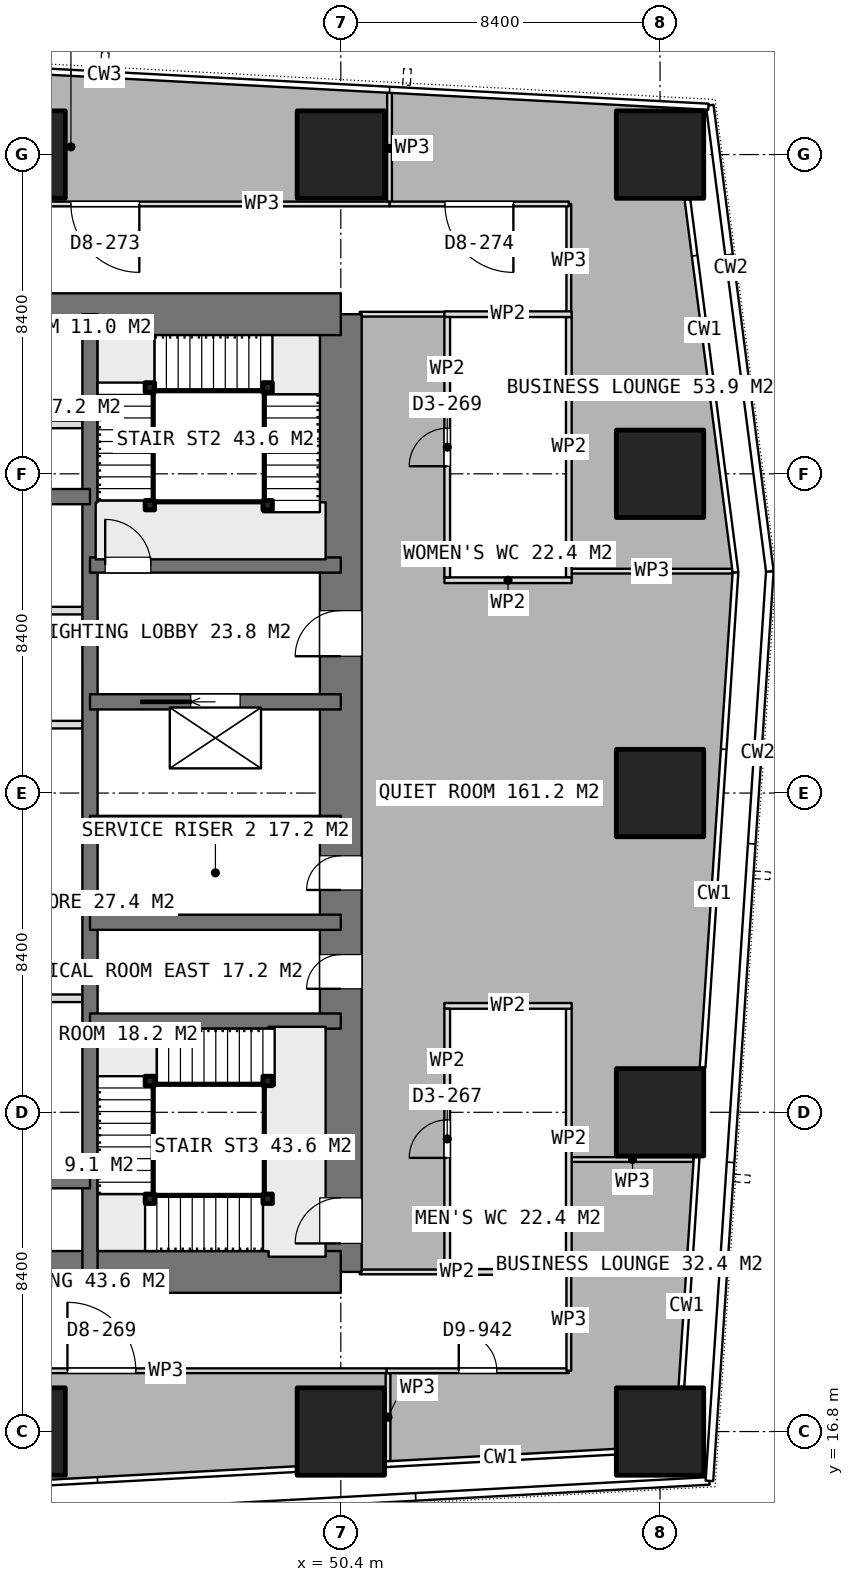
"""IFC4 building model, lengths in metres.
Left out: names, types, materials, properties, quantities, classifications, styles, units other than length and angle.
Written with IfcOpenShell. Run it as: python <this file> out.ifc"""

import sys

from ifc_helpers import new_model, si_unit, direction, frame, frame_2d, origin, origin_2d, place, context, subcontext, project, spatial, rectangle, extrude, element, fill, save


model = new_model("IFC4")
c1 = context("Model", 3, precision=1e-05, world=origin(), true_north=direction((0.0, 1.0)))
c2 = subcontext(c1, "Body", "Model", "MODEL_VIEW")
j1 = project(units=[si_unit("LENGTHUNIT", "METRE"), si_unit("PLANEANGLEUNIT", "RADIAN")], contexts=[c1])
p1 = place(None, origin())
s1 = spatial("IfcSite", under=j1, at=p1, CompositionType="ELEMENT")
p2 = place(p1, origin())
s2 = spatial("IfcBuilding", under=s1, at=p2, CompositionType="ELEMENT")
p3 = place(p2, frame((0.0, 0.0, 250.1)))
s3 = spatial("IfcBuildingStorey", under=s2, at=p3, CompositionType="ELEMENT", Elevation=250.1)
for number, where, z_axis, x_axis in (
    (1, (40.0, 21.0, 0.0), (0.0, 0.0, 1.0), (1.0, 0.0, 0.0)),
    (2, (40.0, 46.2, 0.0), (0.0, 0.0, 1.0), (1.0, 0.0, 0.0)),
):
    element("IfcWall", number, at=place(p3, frame(where, z_axis=z_axis, x_axis=x_axis)), inside=s3, PredefinedType="SHEAR", context=c2, shape_type="SweptSolid", body=[
        extrude(rectangle(XDim=10.4, YDim=1.1, at=frame_2d((5.2, 0.0))), origin(), (0.0, 0.0, 1.0), 3.75),
    ])
p4 = place(p3, frame((50.4, 21.0, 0.0), z_axis=(0.0, 0.0, 1.0), x_axis=(0.0, 1.0, 0.0)))
e3 = element("IfcWall", 3, at=p4, inside=s3, PredefinedType="SHEAR", context=c2, shape_type="SweptSolid", body=[
    extrude(rectangle(XDim=25.2, YDim=1.1, at=frame_2d((12.6, 0.0))), origin(), (0.0, 0.0, 1.0), 3.75),
])
p5 = place(p4, frame((16.2, 0.0, 0.0)))
e4 = element("IfcOpeningElement", 4, at=p5, cuts=e3, PredefinedType="OPENING", context=c2, shape_type="SweptSolid", body=[
    extrude(rectangle(XDim=1.2, YDim=2.1, at=frame_2d((0.6, 1.05))), frame((0.0, 0.56, 0.0), z_axis=(0.0, -1.0, 0.0), x_axis=(1.0, 0.0, 0.0)), (0.0, 0.0, 1.0), 1.12),
])
p6 = place(p4, frame((10.05, 0.0, 0.0)))
e5 = element("IfcOpeningElement", 5, at=p6, cuts=e3, PredefinedType="OPENING", context=c2, shape_type="SweptSolid", body=[
    extrude(rectangle(XDim=0.9, YDim=2.1, at=frame_2d((0.45, 1.05))), frame((0.0, 0.56, 0.0), z_axis=(0.0, -1.0, 0.0), x_axis=(1.0, 0.0, 0.0)), (0.0, 0.0, 1.0), 1.12),
])
p7 = place(p4, frame((7.45, 0.0, 0.0)))
e6 = element("IfcOpeningElement", 6, at=p7, cuts=e3, PredefinedType="OPENING", context=c2, shape_type="SweptSolid", body=[
    extrude(rectangle(XDim=0.9, YDim=2.1, at=frame_2d((0.45, 1.05))), frame((0.0, 0.56, 0.0), z_axis=(0.0, -1.0, 0.0), x_axis=(1.0, 0.0, 0.0)), (0.0, 0.0, 1.0), 1.12),
])
p8 = place(p4, frame((0.75, 0.0, 0.0)))
e7 = element("IfcOpeningElement", 7, at=p8, cuts=e3, PredefinedType="OPENING", context=c2, shape_type="SweptSolid", body=[
    extrude(rectangle(XDim=1.2, YDim=2.1, at=frame_2d((0.6, 1.05))), frame((0.0, 0.56, 0.0), z_axis=(0.0, -1.0, 0.0), x_axis=(1.0, 0.0, 0.0)), (0.0, 0.0, 1.0), 1.12),
])
p9 = place(p3, frame((43.8, 21.0, 0.0), z_axis=(0.0, 0.0, 1.0), x_axis=(0.0, 1.0, 0.0)))
e8 = element("IfcWall", 8, at=p9, inside=s3, PredefinedType="SHEAR", context=c2, shape_type="SweptSolid", body=[
    extrude(rectangle(XDim=25.2, YDim=0.4, at=frame_2d((12.6, 0.0))), origin(), (0.0, 0.0, 1.0), 3.75),
])
for number, where, z_axis, x_axis in (
    (9, (40.0, 23.4, 0.0), (0.0, 0.0, 1.0), (1.0, 0.0, 0.0)),
    (10, (40.0, 41.4, 0.0), (0.0, 0.0, 1.0), (1.0, 0.0, 0.0)),
):
    element("IfcWall", number, at=place(p3, frame(where, z_axis=z_axis, x_axis=x_axis)), inside=s3, PredefinedType="SHEAR", context=c2, shape_type="SweptSolid", body=[
        extrude(rectangle(XDim=3.8, YDim=0.4, at=frame_2d((1.9, 0.0))), origin(), (0.0, 0.0, 1.0), 3.75),
    ])
for number, where, z_axis, x_axis in (
    (11, (43.8, 27.6, 0.0), (0.0, 0.0, 1.0), (1.0, 0.0, 0.0)),
    (12, (43.8, 30.2, 0.0), (0.0, 0.0, 1.0), (1.0, 0.0, 0.0)),
    (13, (43.8, 32.8, 0.0), (0.0, 0.0, 1.0), (1.0, 0.0, 0.0)),
):
    element("IfcWall", number, at=place(p3, frame(where, z_axis=z_axis, x_axis=x_axis)), inside=s3, PredefinedType="SHEAR", context=c2, shape_type="SweptSolid", body=[
        extrude(rectangle(XDim=6.6, YDim=0.4, at=frame_2d((3.3, 0.0))), origin(), (0.0, 0.0, 1.0), 3.75),
    ])
p10 = place(p3, frame((43.8, 36.0, 0.0), z_axis=(0.0, 0.0, 1.0), x_axis=(1.0, 0.0, 0.0)))
e14 = element("IfcWall", 14, at=p10, inside=s3, PredefinedType="SHEAR", context=c2, shape_type="SweptSolid", body=[
    extrude(rectangle(XDim=6.6, YDim=0.4, at=frame_2d((3.3, 0.0))), origin(), (0.0, 0.0, 1.0), 3.75),
])
p11 = place(p10, frame((2.65, 0.0, 0.0)))
e15 = element("IfcOpeningElement", 15, at=p11, cuts=e14, PredefinedType="OPENING", context=c2, shape_type="SweptSolid", body=[
    extrude(rectangle(XDim=1.3, YDim=2.1, at=frame_2d((0.65, 1.05))), frame((0.0, 0.21, 0.0), z_axis=(0.0, -1.0, 0.0), x_axis=(1.0, 0.0, 0.0)), (0.0, 0.0, 1.0), 0.42),
])
p12 = place(p3, frame((43.8, 39.6, 0.0), z_axis=(0.0, 0.0, 1.0), x_axis=(1.0, 0.0, 0.0)))
e16 = element("IfcWall", 16, at=p12, inside=s3, PredefinedType="SHEAR", context=c2, shape_type="SweptSolid", body=[
    extrude(rectangle(XDim=6.6, YDim=0.4, at=frame_2d((3.3, 0.0))), origin(), (0.0, 0.0, 1.0), 3.75),
])
p13 = place(p12, frame((0.4, 0.0, 0.0)))
e17 = element("IfcOpeningElement", 17, at=p13, cuts=e16, PredefinedType="OPENING", context=c2, shape_type="SweptSolid", body=[
    extrude(rectangle(XDim=1.2, YDim=2.1, at=frame_2d((0.6, 1.05))), frame((0.0, 0.21, 0.0), z_axis=(0.0, -1.0, 0.0), x_axis=(1.0, 0.0, 0.0)), (0.0, 0.0, 1.0), 0.42),
])
for number, where, z_axis, x_axis in (
    (18, (42.0, 16.8, 0.0), (0.0, 0.0, 1.0), (1.0, 0.0, 0.0)),
    (19, (42.0, 50.4, 0.0), (0.0, 0.0, 1.0), (1.0, 0.0, 0.0)),
    (20, (50.4, 16.8, 0.0), (0.0, 0.0, 1.0), (1.0, 0.0, 0.0)),
    (21, (50.4, 50.4, 0.0), (0.0, 0.0, 1.0), (1.0, 0.0, 0.0)),
    (22, (58.8, 16.8, 0.0), (0.0, 0.0, 1.0), (1.0, 0.0, 0.0)),
    (23, (58.8, 25.2, 0.0), (0.0, 0.0, 1.0), (1.0, 0.0, 0.0)),
    (24, (58.8, 33.6, 0.0), (0.0, 0.0, 1.0), (1.0, 0.0, 0.0)),
    (25, (58.8, 42.0, 0.0), (0.0, 0.0, 1.0), (1.0, 0.0, 0.0)),
    (26, (58.8, 50.4, 0.0), (0.0, 0.0, 1.0), (1.0, 0.0, 0.0)),
):
    element("IfcColumn", number, at=place(p3, frame(where, z_axis=z_axis, x_axis=x_axis)), inside=s3, PredefinedType="COLUMN", context=c2, shape_type="SweptSolid", body=[
        extrude(rectangle(XDim=2.3, YDim=2.3, at=origin_2d()), origin(), (0.0, 0.0, 1.0), 3.75),
    ])
for number, where, z_axis, x_axis in (
    (27, (40.5, 35.4, 0.0), (0.0, 0.0, 1.0), (1.0, 0.0, 0.0)),
    (28, (40.5, 38.4, 0.0), (0.0, 0.0, 1.0), (1.0, 0.0, 0.0)),
    (29, (40.5, 28.2, 0.0), (0.0, 0.0, 1.0), (1.0, 0.0, 0.0)),
):
    element("IfcWall", number, at=place(p3, frame(where, z_axis=z_axis, x_axis=x_axis)), inside=s3, PredefinedType="PARTITIONING", context=c2, shape_type="SweptSolid", body=[
        extrude(rectangle(XDim=3.1, YDim=0.2, at=frame_2d((1.55, 0.0))), origin(), (0.0, 0.0, 1.0), 3.5),
    ])
p14 = place(p3, frame((40.0, 43.3, 0.0), z_axis=(0.0, 0.0, 1.0), x_axis=(1.0, 0.0, 0.0)))
e30 = element("IfcWall", 30, at=p14, inside=s3, PredefinedType="PARTITIONING", context=c2, shape_type="SweptSolid", body=[
    extrude(rectangle(XDim=3.6, YDim=0.2, at=frame_2d((1.8, 0.0))), origin(), (0.0, 0.0, 1.0), 3.5),
])
for number, where, z_axis, x_axis in (
    (31, (53.125, 39.2, 0.0), (0.0, 0.0, 1.0), (1.0, 0.0, 0.0)),
    (32, (53.125, 46.2, 0.0), (0.0, 0.0, 1.0), (1.0, 0.0, 0.0)),
):
    element("IfcWall", number, at=place(p3, frame(where, z_axis=z_axis, x_axis=x_axis)), inside=s3, PredefinedType="PARTITIONING", context=c2, shape_type="SweptSolid", body=[
        extrude(rectangle(XDim=3.35, YDim=0.15, at=frame_2d((1.675, 0.0))), origin(), (0.0, 0.0, 1.0), 3.5),
    ])
p15 = place(p3, frame((53.2, 39.275, 0.0), z_axis=(0.0, 0.0, 1.0), x_axis=(0.0, 1.0, 0.0)))
e33 = element("IfcWall", 33, at=p15, inside=s3, PredefinedType="PARTITIONING", context=c2, shape_type="SweptSolid", body=[
    extrude(rectangle(XDim=6.85, YDim=0.15, at=frame_2d((3.425, 0.0))), origin(), (0.0, 0.0, 1.0), 3.5),
])
p16 = place(p15, frame((2.925, 0.0, 0.0)))
e34 = element("IfcOpeningElement", 34, at=p16, cuts=e33, PredefinedType="OPENING", context=c2, shape_type="SweptSolid", body=[
    extrude(rectangle(XDim=1.0, YDim=2.1, at=frame_2d((0.5, 1.05))), frame((0.0, 0.085, 0.0), z_axis=(0.0, -1.0, 0.0), x_axis=(1.0, 0.0, 0.0)), (0.0, 0.0, 1.0), 0.17),
])
p17 = place(p3, frame((56.4, 39.275, 0.0), z_axis=(0.0, 0.0, 1.0), x_axis=(0.0, 1.0, 0.0)))
e35 = element("IfcWall", 35, at=p17, inside=s3, PredefinedType="PARTITIONING", context=c2, shape_type="SweptSolid", body=[
    extrude(rectangle(XDim=6.85, YDim=0.15, at=frame_2d((3.425, 0.0))), origin(), (0.0, 0.0, 1.0), 3.5),
])
for number, where, z_axis, x_axis in (
    (36, (53.125, 21.0, 0.0), (0.0, 0.0, 1.0), (1.0, 0.0, 0.0)),
    (37, (53.125, 28.0, 0.0), (0.0, 0.0, 1.0), (1.0, 0.0, 0.0)),
):
    element("IfcWall", number, at=place(p3, frame(where, z_axis=z_axis, x_axis=x_axis)), inside=s3, PredefinedType="PARTITIONING", context=c2, shape_type="SweptSolid", body=[
        extrude(rectangle(XDim=3.35, YDim=0.15, at=frame_2d((1.675, 0.0))), origin(), (0.0, 0.0, 1.0), 3.5),
    ])
p18 = place(p3, frame((53.2, 21.075, 0.0), z_axis=(0.0, 0.0, 1.0), x_axis=(0.0, 1.0, 0.0)))
e38 = element("IfcWall", 38, at=p18, inside=s3, PredefinedType="PARTITIONING", context=c2, shape_type="SweptSolid", body=[
    extrude(rectangle(XDim=6.85, YDim=0.15, at=frame_2d((3.425, 0.0))), origin(), (0.0, 0.0, 1.0), 3.5),
])
p19 = place(p18, frame((2.925, 0.0, 0.0)))
e39 = element("IfcOpeningElement", 39, at=p19, cuts=e38, PredefinedType="OPENING", context=c2, shape_type="SweptSolid", body=[
    extrude(rectangle(XDim=1.0, YDim=2.1, at=frame_2d((0.5, 1.05))), frame((0.0, 0.085, 0.0), z_axis=(0.0, -1.0, 0.0), x_axis=(1.0, 0.0, 0.0)), (0.0, 0.0, 1.0), 0.17),
])
p20 = place(p3, frame((56.4, 21.075, 0.0), z_axis=(0.0, 0.0, 1.0), x_axis=(0.0, 1.0, 0.0)))
e40 = element("IfcWall", 40, at=p20, inside=s3, PredefinedType="PARTITIONING", context=c2, shape_type="SweptSolid", body=[
    extrude(rectangle(XDim=6.85, YDim=0.15, at=frame_2d((3.425, 0.0))), origin(), (0.0, 0.0, 1.0), 3.5),
])
p21 = place(p3, frame((59.679, 23.957, 0.0), z_axis=(0.0, 0.0, 1.0), x_axis=(-1.0, 0.0, 0.0)))
e41 = element("IfcWall", 41, at=p21, inside=s3, PredefinedType="PARTITIONING", context=c2, shape_type="SweptSolid", body=[
    extrude(rectangle(XDim=3.204, YDim=0.125, at=frame_2d((1.602, 0.0))), origin(), (0.0, 0.0, 1.0), 3.5),
])
for number, where, z_axis, x_axis in (
    (42, (53.124, 21.0, 0.0), (0.0, 0.0, 1.0), (-1.0, 0.0, 0.0)),
    (43, (50.9, 46.2, 0.0), (0.0, 0.0, 1.0), (1.0, 0.0, 0.0)),
):
    element("IfcWall", number, at=place(p3, frame(where, z_axis=z_axis, x_axis=x_axis)), inside=s3, PredefinedType="PARTITIONING", context=c2, shape_type="SweptSolid", body=[
        extrude(rectangle(XDim=2.224, YDim=0.125, at=frame_2d((1.112, 0.0))), origin(), (0.0, 0.0, 1.0), 3.5),
    ])
p22 = place(p3, frame((56.475, 39.439, 0.0), z_axis=(0.0, 0.0, 1.0), x_axis=(1.0, 0.0, 0.0)))
e44 = element("IfcWall", 44, at=p22, inside=s3, PredefinedType="PARTITIONING", context=c2, shape_type="SweptSolid", body=[
    extrude(rectangle(XDim=4.225, YDim=0.125, at=frame_2d((2.112, 0.0))), origin(), (0.0, 0.0, 1.0), 3.5),
])
p23 = place(p3, frame((51.682, 49.1, 0.0), z_axis=(0.0, 0.0, 1.0), x_axis=(0.0, 1.0, 0.0)))
e45 = element("IfcWall", 45, at=p23, inside=s3, PredefinedType="PARTITIONING", context=c2, shape_type="SweptSolid", body=[
    extrude(rectangle(XDim=2.926, YDim=0.125, at=frame_2d((1.463, 0.0))), origin(), (0.0, 0.0, 1.0), 3.5),
])
p24 = place(p3, frame((56.4, 46.125, 0.0), z_axis=(0.0, 0.0, 1.0), x_axis=(0.0, 1.0, 0.0)))
e46 = element("IfcWall", 46, at=p24, inside=s3, PredefinedType="PARTITIONING", context=c2, shape_type="SweptSolid", body=[
    extrude(rectangle(XDim=2.975, YDim=0.125, at=frame_2d((1.488, 0.0))), origin(), (0.0, 0.0, 1.0), 3.5),
])
p25 = place(p3, frame((56.4, 49.1, 0.0), z_axis=(0.0, 0.0, 1.0), x_axis=(-1.0, 0.0, 0.0)))
e47 = element("IfcWall", 47, at=p25, inside=s3, PredefinedType="PARTITIONING", context=c2, shape_type="SweptSolid", body=[
    extrude(rectangle(XDim=4.718, YDim=0.125, at=frame_2d((2.359, 0.0))), origin(), (0.0, 0.0, 1.0), 3.5),
])
p26 = place(p25, frame((1.459, 0.0, 0.0)))
e48 = element("IfcOpeningElement", 48, at=p26, cuts=e47, PredefinedType="OPENING", context=c2, shape_type="SweptSolid", body=[
    extrude(rectangle(XDim=1.8, YDim=2.1, at=frame_2d((0.9, 1.05))), frame((0.0, 0.073, 0.0), z_axis=(0.0, -1.0, 0.0), x_axis=(1.0, 0.0, 0.0)), (0.0, 0.0, 1.0), 0.145),
])
p27 = place(p3, frame((51.681, 49.1, 0.0), z_axis=(0.0, 0.0, 1.0), x_axis=(-1.0, 0.0, 0.0)))
e49 = element("IfcWall", 49, at=p27, inside=s3, PredefinedType="PARTITIONING", context=c2, shape_type="SweptSolid", body=[
    extrude(rectangle(XDim=16.765, YDim=0.125, at=frame_2d((8.382, 0.0))), origin(), (0.0, 0.0, 1.0), 3.5),
])
p28 = place(p27, frame((6.583, 0.0, 0.0)))
e50 = element("IfcOpeningElement", 50, at=p28, cuts=e49, PredefinedType="OPENING", context=c2, shape_type="SweptSolid", body=[
    extrude(rectangle(XDim=1.8, YDim=2.1, at=frame_2d((0.9, 1.05))), frame((0.0, 0.073, 0.0), z_axis=(0.0, -1.0, 0.0), x_axis=(1.0, 0.0, 0.0)), (0.0, 0.0, 1.0), 0.145),
])
p29 = place(p3, frame((35.004, 18.4, 0.0), z_axis=(0.0, 0.0, 1.0), x_axis=(1.0, 0.0, 0.0)))
e51 = element("IfcWall", 51, at=p29, inside=s3, PredefinedType="PARTITIONING", context=c2, shape_type="SweptSolid", body=[
    extrude(rectangle(XDim=16.604, YDim=0.125, at=frame_2d((8.302, 0.0))), origin(), (0.0, 0.0, 1.0), 3.5),
])
p30 = place(p29, frame((8.202, 0.0, 0.0)))
e52 = element("IfcOpeningElement", 52, at=p30, cuts=e51, PredefinedType="OPENING", context=c2, shape_type="SweptSolid", body=[
    extrude(rectangle(XDim=1.8, YDim=2.1, at=frame_2d((0.9, 1.05))), frame((0.0, 0.073, 0.0), z_axis=(0.0, -1.0, 0.0), x_axis=(1.0, 0.0, 0.0)), (0.0, 0.0, 1.0), 0.145),
])
p31 = place(p3, frame((51.642, 18.337, 0.0), z_axis=(0.0, 0.0, 1.0), x_axis=(0.0, -1.0, 0.0)))
e53 = element("IfcWall", 53, at=p31, inside=s3, PredefinedType="PARTITIONING", context=c2, shape_type="SweptSolid", body=[
    extrude(rectangle(XDim=2.314, YDim=0.125, at=frame_2d((1.157, 0.0))), origin(), (0.0, 0.0, 1.0), 3.5),
])
p32 = place(p3, frame((51.608, 18.4, 0.0), z_axis=(0.0, 0.0, 1.0), x_axis=(1.0, 0.0, 0.0)))
e54 = element("IfcWall", 54, at=p32, inside=s3, PredefinedType="PARTITIONING", context=c2, shape_type="SweptSolid", body=[
    extrude(rectangle(XDim=4.792, YDim=0.125, at=frame_2d((2.396, 0.0))), origin(), (0.0, 0.0, 1.0), 3.5),
])
p33 = place(p32, frame((1.896, 0.0, 0.0)))
e55 = element("IfcOpeningElement", 55, at=p33, cuts=e54, PredefinedType="OPENING", context=c2, shape_type="SweptSolid", body=[
    extrude(rectangle(XDim=1.0, YDim=2.1, at=frame_2d((0.5, 1.05))), frame((0.0, 0.073, 0.0), z_axis=(0.0, -1.0, 0.0), x_axis=(1.0, 0.0, 0.0)), (0.0, 0.0, 1.0), 0.145),
])
p34 = place(p3, frame((56.4, 18.4, 0.0), z_axis=(0.0, 0.0, 1.0), x_axis=(0.0, 1.0, 0.0)))
e56 = element("IfcWall", 56, at=p34, inside=s3, PredefinedType="PARTITIONING", context=c2, shape_type="SweptSolid", body=[
    extrude(rectangle(XDim=2.675, YDim=0.125, at=frame_2d((1.337, 0.0))), origin(), (0.0, 0.0, 1.0), 3.5),
])
for number, where, z_axis, x_axis in (
    (57, (45.375, 41.175, 0.0), (0.0, 0.0, 1.0), (1.0, 0.0, 0.0)),
    (58, (45.375, 44.275, 0.0), (0.0, 0.0, 1.0), (1.0, 0.0, 0.0)),
    (59, (48.475, 44.275, 0.0), (0.0, 0.0, 1.0), (1.0, 0.0, 0.0)),
    (60, (48.475, 41.175, 0.0), (0.0, 0.0, 1.0), (1.0, 0.0, 0.0)),
    (61, (48.475, 22.925, 0.0), (0.0, 0.0, 1.0), (1.0, 0.0, 0.0)),
    (62, (45.375, 22.925, 0.0), (0.0, 0.0, 1.0), (1.0, 0.0, 0.0)),
    (63, (45.375, 26.025, 0.0), (0.0, 0.0, 1.0), (1.0, 0.0, 0.0)),
    (64, (48.475, 26.025, 0.0), (0.0, 0.0, 1.0), (1.0, 0.0, 0.0)),
):
    element("IfcColumn", number, at=place(p3, frame(where, z_axis=z_axis, x_axis=x_axis)), inside=s3, PredefinedType="COLUMN", context=c2, shape_type="SweptSolid", body=[
        extrude(rectangle(XDim=0.25, YDim=0.25, at=origin_2d()), origin(), (0.0, 0.0, 1.0), 3.75),
    ])
p35 = place(p5, origin())
e65 = element("IfcDoor", 65, at=p35, inside=s3, OperationType="SINGLE_SWING_LEFT", PredefinedType="DOOR", context=c2, shape_type="SweptSolid", body=[
    extrude(rectangle(XDim=1.2, YDim=2.1, at=frame_2d((0.6, 1.05))), frame((0.0, 0.025, 0.0), z_axis=(0.0, -1.0, 0.0), x_axis=(1.0, 0.0, 0.0)), (0.0, 0.0, 1.0), 0.05),
])
fill(e4, e65)
p36 = place(p6, origin())
e66 = element("IfcDoor", 66, at=p36, inside=s3, OperationType="SINGLE_SWING_LEFT", PredefinedType="DOOR", context=c2, shape_type="SweptSolid", body=[
    extrude(rectangle(XDim=0.9, YDim=2.1, at=frame_2d((0.45, 1.05))), frame((0.0, 0.025, 0.0), z_axis=(0.0, -1.0, 0.0), x_axis=(1.0, 0.0, 0.0)), (0.0, 0.0, 1.0), 0.05),
])
fill(e5, e66)
p37 = place(p7, origin())
e67 = element("IfcDoor", 67, at=p37, inside=s3, OperationType="SINGLE_SWING_LEFT", PredefinedType="DOOR", context=c2, shape_type="SweptSolid", body=[
    extrude(rectangle(XDim=0.9, YDim=2.1, at=frame_2d((0.45, 1.05))), frame((0.0, 0.025, 0.0), z_axis=(0.0, -1.0, 0.0), x_axis=(1.0, 0.0, 0.0)), (0.0, 0.0, 1.0), 0.05),
])
fill(e6, e67)
p38 = place(p11, origin())
e68 = element("IfcDoor", 68, at=p38, inside=s3, OperationType="SLIDING_TO_LEFT", PredefinedType="USERDEFINED", context=c2, shape_type="SweptSolid", body=[
    extrude(rectangle(XDim=1.3, YDim=2.1, at=frame_2d((0.65, 1.05))), frame((0.0, 0.025, 0.0), z_axis=(0.0, -1.0, 0.0), x_axis=(1.0, 0.0, 0.0)), (0.0, 0.0, 1.0), 0.05),
])
fill(e15, e68)
p39 = place(p16, origin())
e69 = element("IfcDoor", 69, at=p39, inside=s3, OperationType="SINGLE_SWING_LEFT", PredefinedType="DOOR", context=c2, shape_type="SweptSolid", body=[
    extrude(rectangle(XDim=1.0, YDim=2.1, at=frame_2d((0.5, 1.05))), frame((0.0, 0.025, 0.0), z_axis=(0.0, -1.0, 0.0), x_axis=(1.0, 0.0, 0.0)), (0.0, 0.0, 1.0), 0.05),
])
fill(e34, e69)
p40 = place(p19, origin())
e70 = element("IfcDoor", 70, at=p40, inside=s3, OperationType="SINGLE_SWING_LEFT", PredefinedType="DOOR", context=c2, shape_type="SweptSolid", body=[
    extrude(rectangle(XDim=1.0, YDim=2.1, at=frame_2d((0.5, 1.05))), frame((0.0, 0.025, 0.0), z_axis=(0.0, -1.0, 0.0), x_axis=(1.0, 0.0, 0.0)), (0.0, 0.0, 1.0), 0.05),
])
fill(e39, e70)
p41 = place(p26, origin())
e71 = element("IfcDoor", 71, at=p41, inside=s3, OperationType="DOUBLE_DOOR_SINGLE_SWING", PredefinedType="DOOR", context=c2, shape_type="SweptSolid", body=[
    extrude(rectangle(XDim=1.8, YDim=2.1, at=frame_2d((0.9, 1.05))), frame((0.0, 0.025, 0.0), z_axis=(0.0, -1.0, 0.0), x_axis=(1.0, 0.0, 0.0)), (0.0, 0.0, 1.0), 0.05),
])
fill(e48, e71)
p42 = place(p28, origin())
e72 = element("IfcDoor", 72, at=p42, inside=s3, OperationType="DOUBLE_DOOR_SINGLE_SWING", PredefinedType="DOOR", context=c2, shape_type="SweptSolid", body=[
    extrude(rectangle(XDim=1.8, YDim=2.1, at=frame_2d((0.9, 1.05))), frame((0.0, 0.025, 0.0), z_axis=(0.0, -1.0, 0.0), x_axis=(1.0, 0.0, 0.0)), (0.0, 0.0, 1.0), 0.05),
])
fill(e50, e72)
p43 = place(p30, origin())
e73 = element("IfcDoor", 73, at=p43, inside=s3, OperationType="DOUBLE_DOOR_SINGLE_SWING", PredefinedType="DOOR", context=c2, shape_type="SweptSolid", body=[
    extrude(rectangle(XDim=1.8, YDim=2.1, at=frame_2d((0.9, 1.05))), frame((0.0, 0.025, 0.0), z_axis=(0.0, -1.0, 0.0), x_axis=(1.0, 0.0, 0.0)), (0.0, 0.0, 1.0), 0.05),
])
fill(e52, e73)
p44 = place(p33, origin())
e74 = element("IfcDoor", 74, at=p44, inside=s3, OperationType="SINGLE_SWING_LEFT", PredefinedType="DOOR", context=c2, shape_type="SweptSolid", body=[
    extrude(rectangle(XDim=1.0, YDim=2.1, at=frame_2d((0.5, 1.05))), frame((0.0, 0.025, 0.0), z_axis=(0.0, -1.0, 0.0), x_axis=(1.0, 0.0, 0.0)), (0.0, 0.0, 1.0), 0.05),
])
fill(e55, e74)
p45 = place(p13, origin())
e75 = element("IfcDoor", 75, at=p45, inside=s3, OperationType="SINGLE_SWING_RIGHT", PredefinedType="DOOR", context=c2, shape_type="SweptSolid", body=[
    extrude(rectangle(XDim=1.2, YDim=2.1, at=frame_2d((0.6, 1.05))), frame((0.0, 0.025, 0.0), z_axis=(0.0, -1.0, 0.0), x_axis=(1.0, 0.0, 0.0)), (0.0, 0.0, 1.0), 0.05),
])
fill(e17, e75)
p46 = place(p8, origin())
e76 = element("IfcDoor", 76, at=p46, inside=s3, OperationType="SINGLE_SWING_RIGHT", PredefinedType="DOOR", context=c2, shape_type="SweptSolid", body=[
    extrude(rectangle(XDim=1.2, YDim=2.1, at=frame_2d((0.6, 1.05))), frame((0.0, 0.025, 0.0), z_axis=(0.0, -1.0, 0.0), x_axis=(1.0, 0.0, 0.0)), (0.0, 0.0, 1.0), 0.05),
])
fill(e7, e76)
save(model, sys.argv[1])
